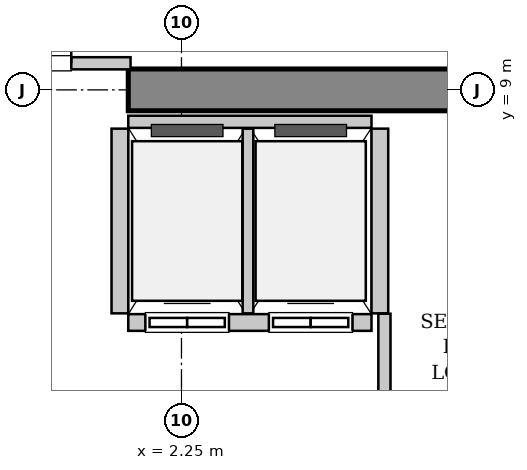
"""IFC4 building model, lengths in metres.
Left out: names, types, materials, properties, quantities, classifications, styles, units other than length and angle.
Written with IfcOpenShell. Run it as: python <this file> out.ifc"""

import sys

from ifc_helpers import new_model, si_unit, direction, frame, frame_2d, origin, place, context, subcontext, project, spatial, rectangle, extrude, source, transform, mapped, element, fill, save


model = new_model("IFC4")
c1 = context("Model", 3, precision=1e-05, world=origin(), true_north=direction((0.0, 1.0)))
c2 = subcontext(c1, "Body", "Model", "MODEL_VIEW")
j1 = project(units=[si_unit("LENGTHUNIT", "METRE"), si_unit("PLANEANGLEUNIT", "RADIAN")], contexts=[c1])
p1 = place(None, origin())
s1 = spatial("IfcSite", under=j1, at=p1, CompositionType="ELEMENT")
p2 = place(p1, origin())
s2 = spatial("IfcBuilding", under=s1, at=p2, CompositionType="ELEMENT")
p3 = place(p2, frame((0.0, 0.0, 140.2)))
s3 = spatial("IfcBuildingStorey", under=s2, at=p3, CompositionType="ELEMENT", Elevation=140.2)
m1 = source(origin(), c2, "Body", "SweptSolid", [
    extrude(rectangle(XDim=9.975, YDim=0.55, at=frame_2d((4.987, 0.0))), origin(), (0.0, 0.0, 1.0), 3.8),
])
p4 = place(p3, frame((1.55, 9.0, 0.0), z_axis=(0.0, 0.0, 1.0), x_axis=(1.0, 0.0, 0.0)))
e1 = element("IfcWall", 1, at=p4, inside=s3, PredefinedType="SHEAR", context=c2, shape_type="MappedRepresentation", body=[
    mapped(m1, transform((0.0, 0.0, 0.0), x_axis=(1.0, 0.0, 0.0), y_axis=(0.0, 1.0, 0.0), z_axis=(0.0, 0.0, 1.0), scale=1.0)),
])
m2 = source(origin(), c2, "Body", "SweptSolid", [
    extrude(rectangle(XDim=3.2, YDim=0.22, at=frame_2d((1.6, 0.0))), origin(), (0.0, 0.0, 1.0), 3.485),
])
p5 = place(p3, frame((1.55, 5.94, 0.0), z_axis=(0.0, 0.0, 1.0), x_axis=(1.0, 0.0, 0.0)))
e2 = element("IfcWall", 2, at=p5, inside=s3, PredefinedType="SOLIDWALL", context=c2, shape_type="MappedRepresentation", body=[
    mapped(m2, transform((0.0, 0.0, 0.0), x_axis=(1.0, 0.0, 0.0), y_axis=(0.0, 1.0, 0.0), z_axis=(0.0, 0.0, 1.0), scale=1.0)),
])
p6 = place(p5, frame((0.225, 0.0, 0.0)))
e3 = element("IfcOpeningElement", 3, at=p6, cuts=e2, PredefinedType="OPENING", context=c2, shape_type="SweptSolid", body=[
    extrude(rectangle(XDim=1.1, YDim=2.2, at=frame_2d((0.55, 1.1))), frame((0.0, 0.12, 0.0), z_axis=(0.0, -1.0, 0.0), x_axis=(1.0, 0.0, 0.0)), (0.0, 0.0, 1.0), 0.24),
])
p7 = place(p5, frame((1.85, 0.0, 0.0)))
e4 = element("IfcOpeningElement", 4, at=p7, cuts=e2, PredefinedType="OPENING", context=c2, shape_type="SweptSolid", body=[
    extrude(rectangle(XDim=1.1, YDim=2.2, at=frame_2d((0.55, 1.1))), frame((0.0, 0.12, 0.0), z_axis=(0.0, -1.0, 0.0), x_axis=(1.0, 0.0, 0.0)), (0.0, 0.0, 1.0), 0.24),
])
m3 = source(origin(), c2, "Body", "SweptSolid", [
    extrude(rectangle(XDim=3.2, YDim=0.16, at=frame_2d((1.6, 0.0))), origin(), (0.0, 0.0, 1.0), 2.375),
])
p8 = place(p3, frame((4.75, 8.58, 0.0), z_axis=(0.0, 0.0, 1.0), x_axis=(-1.0, 0.0, 0.0)))
e5 = element("IfcWall", 5, at=p8, inside=s3, PredefinedType="PARTITIONING", context=c2, shape_type="MappedRepresentation", body=[
    mapped(m3, transform((0.0, 0.0, 0.0), x_axis=(1.0, 0.0, 0.0), y_axis=(0.0, 1.0, 0.0), z_axis=(0.0, 0.0, 1.0), scale=1.0)),
])
m4 = source(origin(), c2, "Body", "SweptSolid", [
    extrude(rectangle(XDim=2.43, YDim=0.22, at=frame_2d((1.215, 0.0))), origin(), (0.0, 0.0, 1.0), 3.485),
])
p9 = place(p3, frame((1.44, 8.49, 0.0), z_axis=(0.0, 0.0, 1.0), x_axis=(0.0, -1.0, 0.0)))
e6 = element("IfcWall", 6, at=p9, inside=s3, PredefinedType="SOLIDWALL", context=c2, shape_type="MappedRepresentation", body=[
    mapped(m4, transform((0.0, 0.0, 0.0), x_axis=(1.0, 0.0, 0.0), y_axis=(0.0, 1.0, 0.0), z_axis=(0.0, 0.0, 1.0), scale=1.0)),
])
m5 = source(origin(), c2, "Body", "SweptSolid", [
    extrude(rectangle(XDim=2.43, YDim=0.14, at=frame_2d((1.215, 0.0))), origin(), (0.0, 0.0, 1.0), 3.485),
])
p10 = place(p3, frame((3.125, 6.06, 0.0), z_axis=(0.0, 0.0, 1.0), x_axis=(0.0, 1.0, 0.0)))
e7 = element("IfcWall", 7, at=p10, inside=s3, PredefinedType="PARTITIONING", context=c2, shape_type="MappedRepresentation", body=[
    mapped(m5, transform((0.0, 0.0, 0.0), x_axis=(1.0, 0.0, 0.0), y_axis=(0.0, 1.0, 0.0), z_axis=(0.0, 0.0, 1.0), scale=1.0)),
])
p11 = place(p3, frame((4.86, 6.06, 0.0), z_axis=(0.0, 0.0, 1.0), x_axis=(0.0, 1.0, 0.0)))
e8 = element("IfcWall", 8, at=p11, inside=s3, PredefinedType="SOLIDWALL", context=c2, shape_type="MappedRepresentation", body=[
    mapped(m4, transform((0.0, 0.0, 0.0), x_axis=(1.0, 0.0, 0.0), y_axis=(0.0, 1.0, 0.0), z_axis=(0.0, 0.0, 1.0), scale=1.0)),
])
m6 = source(origin(), c2, "Body", "SweptSolid", [
    extrude(rectangle(XDim=3.16, YDim=0.16, at=frame_2d((1.58, 0.0))), origin(), (0.0, 0.0, 1.0), 2.375),
])
p12 = place(p3, frame((-1.58, 9.35, 0.0), z_axis=(0.0, 0.0, 1.0), x_axis=(1.0, 0.0, 0.0)))
e9 = element("IfcWall", 9, at=p12, inside=s3, PredefinedType="PARTITIONING", context=c2, shape_type="MappedRepresentation", body=[
    mapped(m6, transform((0.0, 0.0, 0.0), x_axis=(1.0, 0.0, 0.0), y_axis=(0.0, 1.0, 0.0), z_axis=(0.0, 0.0, 1.0), scale=1.0)),
])
p13 = place(p12, frame((0.78, 0.0, 0.0)))
e10 = element("IfcOpeningElement", 10, at=p13, cuts=e9, PredefinedType="OPENING", context=c2, shape_type="SweptSolid", body=[
    extrude(rectangle(XDim=1.6, YDim=2.3, at=frame_2d((0.8, 1.15))), frame((0.0, 0.09, 0.0), z_axis=(0.0, -1.0, 0.0), x_axis=(1.0, 0.0, 0.0)), (0.0, 0.0, 1.0), 0.18),
])
m7 = source(origin(), c2, "Body", "SweptSolid", [
    extrude(rectangle(XDim=3.015, YDim=0.16, at=frame_2d((1.507, 0.0))), origin(), (0.0, 0.0, 1.0), 3.485),
])
p14 = place(p3, frame((4.92, 3.04, 0.0), z_axis=(0.0, 0.0, 1.0), x_axis=(0.0, 1.0, 0.0)))
e11 = element("IfcWall", 11, at=p14, inside=s3, PredefinedType="PARTITIONING", context=c2, shape_type="MappedRepresentation", body=[
    mapped(m7, transform((0.0, 0.0, 0.0), x_axis=(1.0, 0.0, 0.0), y_axis=(0.0, 1.0, 0.0), z_axis=(0.0, 0.0, 1.0), scale=1.0)),
])
m8 = source(origin(), c2, "Body", "SweptSolid", [
    extrude(rectangle(XDim=1.1, YDim=2.2, at=frame_2d((0.55, 1.1))), frame((0.0, 0.025, 0.0), z_axis=(0.0, -1.0, 0.0), x_axis=(1.0, 0.0, 0.0)), (0.0, 0.0, 1.0), 0.05),
])
p15 = place(p6, origin())
e12 = element("IfcDoor", 12, at=p15, inside=s3, OperationType="DOUBLE_DOOR_SLIDING", PredefinedType="DOOR", context=c2, shape_type="MappedRepresentation", body=[
    mapped(m8, transform((0.0, 0.0, 0.0), x_axis=(1.0, 0.0, 0.0), y_axis=(0.0, 1.0, 0.0), z_axis=(0.0, 0.0, 1.0), scale=1.0)),
])
fill(e3, e12)
p16 = place(p7, origin())
e13 = element("IfcDoor", 13, at=p16, inside=s3, OperationType="DOUBLE_DOOR_SLIDING", PredefinedType="DOOR", context=c2, shape_type="MappedRepresentation", body=[
    mapped(m8, transform((0.0, 0.0, 0.0), x_axis=(1.0, 0.0, 0.0), y_axis=(0.0, 1.0, 0.0), z_axis=(0.0, 0.0, 1.0), scale=1.0)),
])
fill(e4, e13)
m9 = source(origin(), c2, "Body", "SweptSolid", [
    extrude(rectangle(XDim=1.6, YDim=2.3, at=frame_2d((0.8, 1.15))), frame((0.0, 0.025, 0.0), z_axis=(0.0, -1.0, 0.0), x_axis=(1.0, 0.0, 0.0)), (0.0, 0.0, 1.0), 0.05),
])
p17 = place(p13, origin())
e14 = element("IfcDoor", 14, at=p17, inside=s3, OperationType="DOUBLE_DOOR_SINGLE_SWING", PredefinedType="DOOR", context=c2, shape_type="MappedRepresentation", body=[
    mapped(m9, transform((0.0, 0.0, 0.0), x_axis=(1.0, 0.0, 0.0), y_axis=(0.0, 1.0, 0.0), z_axis=(0.0, 0.0, 1.0), scale=1.0)),
])
fill(e10, e14)
save(model, sys.argv[1])
